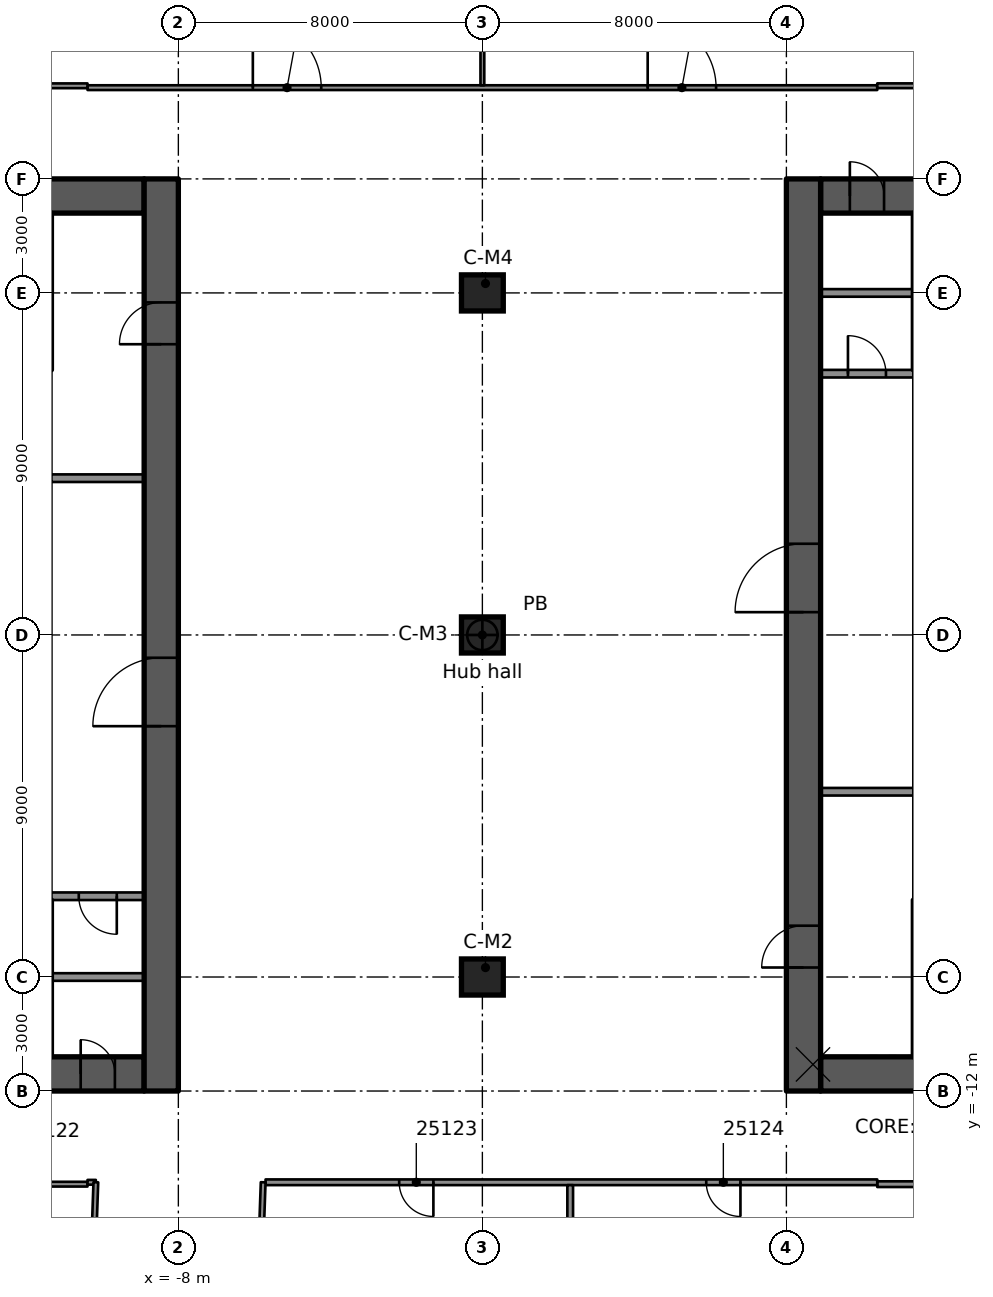
"""IFC4 building model, lengths in metres.
Left out: names, types, materials, properties, quantities, classifications, styles, units other than length and angle.
Written with IfcOpenShell. Run it as: python <this file> out.ifc"""

import sys

from ifc_helpers import new_model, si_unit, direction, frame, frame_2d, origin, origin_2d, place, context, subcontext, project, spatial, rectangle, extrude, element, fill, save


model = new_model("IFC4")
c1 = context("Model", 3, precision=1e-05, world=origin(), true_north=direction((0.0, 1.0)))
c2 = subcontext(c1, "Body", "Model", "MODEL_VIEW")
j1 = project(units=[si_unit("LENGTHUNIT", "METRE"), si_unit("PLANEANGLEUNIT", "RADIAN")], contexts=[c1])
p1 = place(None, origin())
s1 = spatial("IfcSite", under=j1, at=p1, CompositionType="ELEMENT")
p2 = place(p1, origin())
s2 = spatial("IfcBuilding", under=s1, at=p2, CompositionType="ELEMENT")
p3 = place(p2, frame((0.0, 0.0, 127.2)))
s3 = spatial("IfcBuildingStorey", under=s2, at=p3, CompositionType="ELEMENT", Elevation=127.2)
p4 = place(p3, frame((-18.1, 11.55, 0.0), z_axis=(0.0, 0.0, 1.0), x_axis=(1.0, 0.0, 0.0)))
e1 = element("IfcWall", 1, at=p4, inside=s3, PredefinedType="SHEAR", context=c2, shape_type="SweptSolid", body=[
    extrude(rectangle(XDim=9.2, YDim=0.9, at=frame_2d((4.6, 0.0))), origin(), (0.0, 0.0, 1.0), 3.5),
])
p5 = place(p4, frame((5.1, 0.0, 0.0)))
e2 = element("IfcOpeningElement", 2, at=p5, cuts=e1, PredefinedType="OPENING", context=c2, shape_type="SweptSolid", body=[
    extrude(rectangle(XDim=1.1, YDim=2.1, at=frame_2d((0.55, 1.05))), frame((0.0, 0.46, 0.0), z_axis=(0.0, -1.0, 0.0), x_axis=(1.0, 0.0, 0.0)), (0.0, 0.0, 1.0), 0.92),
])
p6 = place(p3, frame((-18.1, -11.55, 0.0), z_axis=(0.0, 0.0, 1.0), x_axis=(1.0, 0.0, 0.0)))
e3 = element("IfcWall", 3, at=p6, inside=s3, PredefinedType="SHEAR", context=c2, shape_type="SweptSolid", body=[
    extrude(rectangle(XDim=9.2, YDim=0.9, at=frame_2d((4.6, 0.0))), origin(), (0.0, 0.0, 1.0), 3.5),
])
p7 = place(p6, frame((5.1, 0.0, 0.0)))
e4 = element("IfcOpeningElement", 4, at=p7, cuts=e3, PredefinedType="OPENING", context=c2, shape_type="SweptSolid", body=[
    extrude(rectangle(XDim=1.1, YDim=2.1, at=frame_2d((0.55, 1.05))), frame((0.0, 0.46, 0.0), z_axis=(0.0, -1.0, 0.0), x_axis=(1.0, 0.0, 0.0)), (0.0, 0.0, 1.0), 0.92),
])
p8 = place(p6, frame((7.53, 0.0, 0.0)))
e5 = element("IfcOpeningElement", 5, at=p8, cuts=e3, PredefinedType="OPENING", context=c2, shape_type="SweptSolid", body=[
    extrude(rectangle(XDim=0.9, YDim=2.1, at=frame_2d((0.45, 1.05))), frame((0.0, 0.46, 0.0), z_axis=(0.0, -1.0, 0.0), x_axis=(1.0, 0.0, 0.0)), (0.0, 0.0, 1.0), 0.92),
])
p9 = place(p3, frame((-8.45, -12.0, 0.0), z_axis=(0.0, 0.0, 1.0), x_axis=(0.0, 1.0, 0.0)))
e6 = element("IfcWall", 6, at=p9, inside=s3, PredefinedType="SHEAR", context=c2, shape_type="SweptSolid", body=[
    extrude(rectangle(XDim=24.0, YDim=0.9, at=frame_2d((12.0, 0.0))), origin(), (0.0, 0.0, 1.0), 3.5),
])
p10 = place(p9, frame((9.6, 0.0, 0.0)))
e7 = element("IfcOpeningElement", 7, at=p10, cuts=e6, PredefinedType="OPENING", context=c2, shape_type="SweptSolid", body=[
    extrude(rectangle(XDim=1.8, YDim=2.1, at=frame_2d((0.9, 1.05))), frame((0.0, 0.46, 0.0), z_axis=(0.0, -1.0, 0.0), x_axis=(1.0, 0.0, 0.0)), (0.0, 0.0, 1.0), 0.92),
])
p11 = place(p9, frame((19.65, 0.0, 0.0)))
e8 = element("IfcOpeningElement", 8, at=p11, cuts=e6, PredefinedType="OPENING", context=c2, shape_type="SweptSolid", body=[
    extrude(rectangle(XDim=1.1, YDim=2.1, at=frame_2d((0.55, 1.05))), frame((0.0, 0.46, 0.0), z_axis=(0.0, -1.0, 0.0), x_axis=(1.0, 0.0, 0.0)), (0.0, 0.0, 1.0), 0.92),
])
p12 = place(p3, frame((8.9, 11.55, 0.0), z_axis=(0.0, 0.0, 1.0), x_axis=(1.0, 0.0, 0.0)))
e9 = element("IfcWall", 9, at=p12, inside=s3, PredefinedType="SHEAR", context=c2, shape_type="SweptSolid", body=[
    extrude(rectangle(XDim=9.2, YDim=0.9, at=frame_2d((4.6, 0.0))), origin(), (0.0, 0.0, 1.0), 3.5),
])
p13 = place(p12, frame((3.0, 0.0, 0.0)))
e10 = element("IfcOpeningElement", 10, at=p13, cuts=e9, PredefinedType="OPENING", context=c2, shape_type="SweptSolid", body=[
    extrude(rectangle(XDim=1.1, YDim=2.1, at=frame_2d((0.55, 1.05))), frame((0.0, 0.46, 0.0), z_axis=(0.0, -1.0, 0.0), x_axis=(1.0, 0.0, 0.0)), (0.0, 0.0, 1.0), 0.92),
])
p14 = place(p12, frame((0.77, 0.0, 0.0)))
e11 = element("IfcOpeningElement", 11, at=p14, cuts=e9, PredefinedType="OPENING", context=c2, shape_type="SweptSolid", body=[
    extrude(rectangle(XDim=0.9, YDim=2.1, at=frame_2d((0.45, 1.05))), frame((0.0, 0.46, 0.0), z_axis=(0.0, -1.0, 0.0), x_axis=(1.0, 0.0, 0.0)), (0.0, 0.0, 1.0), 0.92),
])
p15 = place(p3, frame((8.9, -11.55, 0.0), z_axis=(0.0, 0.0, 1.0), x_axis=(1.0, 0.0, 0.0)))
e12 = element("IfcWall", 12, at=p15, inside=s3, PredefinedType="SHEAR", context=c2, shape_type="SweptSolid", body=[
    extrude(rectangle(XDim=9.2, YDim=0.9, at=frame_2d((4.6, 0.0))), origin(), (0.0, 0.0, 1.0), 3.5),
])
p16 = place(p15, frame((3.0, 0.0, 0.0)))
e13 = element("IfcOpeningElement", 13, at=p16, cuts=e12, PredefinedType="OPENING", context=c2, shape_type="SweptSolid", body=[
    extrude(rectangle(XDim=1.1, YDim=2.1, at=frame_2d((0.55, 1.05))), frame((0.0, 0.46, 0.0), z_axis=(0.0, -1.0, 0.0), x_axis=(1.0, 0.0, 0.0)), (0.0, 0.0, 1.0), 0.92),
])
p17 = place(p3, frame((8.45, -12.0, 0.0), z_axis=(0.0, 0.0, 1.0), x_axis=(0.0, 1.0, 0.0)))
e14 = element("IfcWall", 14, at=p17, inside=s3, PredefinedType="SHEAR", context=c2, shape_type="SweptSolid", body=[
    extrude(rectangle(XDim=24.0, YDim=0.9, at=frame_2d((12.0, 0.0))), origin(), (0.0, 0.0, 1.0), 3.5),
])
p18 = place(p17, frame((12.6, 0.0, 0.0)))
e15 = element("IfcOpeningElement", 15, at=p18, cuts=e14, PredefinedType="OPENING", context=c2, shape_type="SweptSolid", body=[
    extrude(rectangle(XDim=1.8, YDim=2.1, at=frame_2d((0.9, 1.05))), frame((0.0, 0.46, 0.0), z_axis=(0.0, -1.0, 0.0), x_axis=(1.0, 0.0, 0.0)), (0.0, 0.0, 1.0), 0.92),
])
p19 = place(p17, frame((3.25, 0.0, 0.0)))
e16 = element("IfcOpeningElement", 16, at=p19, cuts=e14, PredefinedType="OPENING", context=c2, shape_type="SweptSolid", body=[
    extrude(rectangle(XDim=1.1, YDim=2.1, at=frame_2d((0.55, 1.05))), frame((0.0, 0.46, 0.0), z_axis=(0.0, -1.0, 0.0), x_axis=(1.0, 0.0, 0.0)), (0.0, 0.0, 1.0), 0.92),
])
for number, where, z_axis, x_axis in (
    (17, (0.0, -9.0, 0.0), (0.0, 0.0, 1.0), (1.0, 0.0, 0.0)),
    (18, (0.0, 0.0, 0.0), (0.0, 0.0, 1.0), (1.0, 0.0, 0.0)),
    (19, (0.0, 9.0, 0.0), (0.0, 0.0, 1.0), (1.0, 0.0, 0.0)),
):
    element("IfcColumn", number, at=place(p3, frame(where, z_axis=z_axis, x_axis=x_axis)), inside=s3, PredefinedType="COLUMN", context=c2, shape_type="SweptSolid", body=[
        extrude(rectangle(XDim=1.1, YDim=0.95, at=origin_2d()), origin(), (0.0, 0.0, 1.0), 3.5),
    ])
p20 = place(p3, frame((-8.9, 4.125, 0.0), z_axis=(0.0, 0.0, 1.0), x_axis=(-1.0, 0.0, 0.0)))
e20 = element("IfcWall", 20, at=p20, inside=s3, PredefinedType="PARTITIONING", context=c2, shape_type="SweptSolid", body=[
    extrude(rectangle(XDim=2.44, YDim=0.2, at=frame_2d((1.22, 0.0))), origin(), (0.0, 0.0, 1.0), 3.09),
])
p21 = place(p3, frame((-8.9, -6.875, 0.0), z_axis=(0.0, 0.0, 1.0), x_axis=(-1.0, 0.0, 0.0)))
e21 = element("IfcWall", 21, at=p21, inside=s3, PredefinedType="PARTITIONING", context=c2, shape_type="SweptSolid", body=[
    extrude(rectangle(XDim=2.44, YDim=0.2, at=frame_2d((1.22, 0.0))), origin(), (0.0, 0.0, 1.0), 3.09),
])
p22 = place(p21, frame((0.72, 0.0, 0.0)))
e22 = element("IfcOpeningElement", 22, at=p22, cuts=e21, PredefinedType="OPENING", context=c2, shape_type="SweptSolid", body=[
    extrude(rectangle(XDim=1.0, YDim=2.1, at=frame_2d((0.5, 1.05))), frame((0.0, 0.11, 0.0), z_axis=(0.0, -1.0, 0.0), x_axis=(1.0, 0.0, 0.0)), (0.0, 0.0, 1.0), 0.22),
])
for number, where, z_axis, x_axis in (
    (23, (-8.9, -9.0, 0.0), (0.0, 0.0, 1.0), (-1.0, 0.0, 0.0)),
    (24, (8.9, -4.125, 0.0), (0.0, 0.0, 1.0), (1.0, 0.0, 0.0)),
):
    element("IfcWall", number, at=place(p3, frame(where, z_axis=z_axis, x_axis=x_axis)), inside=s3, PredefinedType="PARTITIONING", context=c2, shape_type="SweptSolid", body=[
        extrude(rectangle(XDim=2.44, YDim=0.2, at=frame_2d((1.22, 0.0))), origin(), (0.0, 0.0, 1.0), 3.09),
    ])
p23 = place(p3, frame((8.9, 6.875, 0.0), z_axis=(0.0, 0.0, 1.0), x_axis=(1.0, 0.0, 0.0)))
e25 = element("IfcWall", 25, at=p23, inside=s3, PredefinedType="PARTITIONING", context=c2, shape_type="SweptSolid", body=[
    extrude(rectangle(XDim=2.44, YDim=0.2, at=frame_2d((1.22, 0.0))), origin(), (0.0, 0.0, 1.0), 3.09),
])
p24 = place(p23, frame((0.72, 0.0, 0.0)))
e26 = element("IfcOpeningElement", 26, at=p24, cuts=e25, PredefinedType="OPENING", context=c2, shape_type="SweptSolid", body=[
    extrude(rectangle(XDim=1.0, YDim=2.1, at=frame_2d((0.5, 1.05))), frame((0.0, 0.11, 0.0), z_axis=(0.0, -1.0, 0.0), x_axis=(1.0, 0.0, 0.0)), (0.0, 0.0, 1.0), 0.22),
])
p25 = place(p3, frame((8.9, 9.0, 0.0), z_axis=(0.0, 0.0, 1.0), x_axis=(1.0, 0.0, 0.0)))
e27 = element("IfcWall", 27, at=p25, inside=s3, PredefinedType="PARTITIONING", context=c2, shape_type="SweptSolid", body=[
    extrude(rectangle(XDim=2.44, YDim=0.2, at=frame_2d((1.22, 0.0))), origin(), (0.0, 0.0, 1.0), 3.09),
])
p26 = place(p3, frame((-10.391, -14.451, 0.0), z_axis=(0.0, 0.0, 1.0), x_axis=(-1.0, 0.0, 0.0)))
e28 = element("IfcWall", 28, at=p26, inside=s3, PredefinedType="PARTITIONING", context=c2, shape_type="SweptSolid", body=[
    extrude(rectangle(XDim=3.609, YDim=0.125, at=frame_2d((1.804, 0.0))), origin(), (0.0, 0.0, 1.0), 3.08),
])
p27 = place(p26, frame((1.35, 0.0, 0.0)))
e29 = element("IfcOpeningElement", 29, at=p27, cuts=e28, PredefinedType="OPENING", context=c2, shape_type="SweptSolid", body=[
    extrude(rectangle(XDim=0.9, YDim=2.1, at=frame_2d((0.45, 1.05))), frame((0.0, 0.073, 0.0), z_axis=(0.0, -1.0, 0.0), x_axis=(1.0, 0.0, 0.0)), (0.0, 0.0, 1.0), 0.145),
])
p28 = place(p3, frame((21.387, -14.451, 0.0), z_axis=(0.0, 0.0, 1.0), x_axis=(-1.0, 0.0, 0.0)))
e30 = element("IfcWall", 30, at=p28, inside=s3, PredefinedType="PARTITIONING", context=c2, shape_type="SweptSolid", body=[
    extrude(rectangle(XDim=10.996, YDim=0.15, at=frame_2d((5.498, 0.0))), origin(), (0.0, 0.0, 1.0), 3.08),
])
p29 = place(p28, frame((3.288, 0.0, 0.0)))
e31 = element("IfcOpeningElement", 31, at=p29, cuts=e30, PredefinedType="OPENING", context=c2, shape_type="SweptSolid", body=[
    extrude(rectangle(XDim=0.9, YDim=2.1, at=frame_2d((0.45, 1.05))), frame((0.0, 0.085, 0.0), z_axis=(0.0, -1.0, 0.0), x_axis=(1.0, 0.0, 0.0)), (0.0, 0.0, 1.0), 0.17),
])
p30 = place(p3, frame((-10.39, -14.401, 0.0), z_axis=(0.0, 0.0, 1.0), x_axis=(1.0, 0.0, 0.0)))
e32 = element("IfcWall", 32, at=p30, inside=s3, PredefinedType="PARTITIONING", context=c2, shape_type="SweptSolid", body=[
    extrude(rectangle(XDim=0.219, YDim=0.125, at=frame_2d((0.109, 0.0))), origin(), (0.0, 0.0, 1.0), 3.08),
])
p31 = place(p3, frame((10.391, -14.401, 0.0), z_axis=(0.0, 0.0, 1.0), x_axis=(-1.0, 0.0, 0.0)))
e33 = element("IfcWall", 33, at=p31, inside=s3, PredefinedType="PARTITIONING", context=c2, shape_type="SweptSolid", body=[
    extrude(rectangle(XDim=16.096, YDim=0.15, at=frame_2d((8.048, 0.0))), origin(), (0.0, 0.0, 1.0), 3.08),
])
p32 = place(p31, frame((11.68, 0.0, 0.0)))
e34 = element("IfcOpeningElement", 34, at=p32, cuts=e33, PredefinedType="OPENING", context=c2, shape_type="SweptSolid", body=[
    extrude(rectangle(XDim=0.9, YDim=2.1, at=frame_2d((0.45, 1.05))), frame((0.0, 0.085, 0.0), z_axis=(0.0, -1.0, 0.0), x_axis=(1.0, 0.0, 0.0)), (0.0, 0.0, 1.0), 0.17),
])
p33 = place(p31, frame((3.6, 0.0, 0.0)))
e35 = element("IfcOpeningElement", 35, at=p33, cuts=e33, PredefinedType="OPENING", context=c2, shape_type="SweptSolid", body=[
    extrude(rectangle(XDim=0.9, YDim=2.1, at=frame_2d((0.45, 1.05))), frame((0.0, 0.085, 0.0), z_axis=(0.0, -1.0, 0.0), x_axis=(1.0, 0.0, 0.0)), (0.0, 0.0, 1.0), 0.17),
])
p34 = place(p3, frame((-10.39, 14.401, 0.0), z_axis=(0.0, 0.0, 1.0), x_axis=(1.0, 0.0, 0.0)))
e36 = element("IfcWall", 36, at=p34, inside=s3, PredefinedType="PARTITIONING", context=c2, shape_type="SweptSolid", body=[
    extrude(rectangle(XDim=20.781, YDim=0.125, at=frame_2d((10.391, 0.0))), origin(), (0.0, 0.0, 1.0), 3.08),
])
p35 = place(p34, frame((14.74, 0.0, 0.0)))
e37 = element("IfcOpeningElement", 37, at=p35, cuts=e36, PredefinedType="OPENING", context=c2, shape_type="SweptSolid", body=[
    extrude(rectangle(XDim=1.8, YDim=2.1, at=frame_2d((0.9, 1.05))), frame((0.0, 0.073, 0.0), z_axis=(0.0, -1.0, 0.0), x_axis=(1.0, 0.0, 0.0)), (0.0, 0.0, 1.0), 0.145),
])
p36 = place(p34, frame((4.35, 0.0, 0.0)))
e38 = element("IfcOpeningElement", 38, at=p36, cuts=e36, PredefinedType="OPENING", context=c2, shape_type="SweptSolid", body=[
    extrude(rectangle(XDim=1.8, YDim=2.1, at=frame_2d((0.9, 1.05))), frame((0.0, 0.073, 0.0), z_axis=(0.0, -1.0, 0.0), x_axis=(1.0, 0.0, 0.0)), (0.0, 0.0, 1.0), 0.145),
])
p37 = place(p3, frame((-25.398, 14.45, 0.0), z_axis=(0.0, 0.0, 1.0), x_axis=(1.0, 0.0, 0.0)))
e39 = element("IfcWall", 39, at=p37, inside=s3, PredefinedType="PARTITIONING", context=c2, shape_type="SweptSolid", body=[
    extrude(rectangle(XDim=15.007, YDim=0.125, at=frame_2d((7.503, 0.0))), origin(), (0.0, 0.0, 1.0), 3.08),
])
p38 = place(p3, frame((10.391, 14.451, 0.0), z_axis=(0.0, 0.0, 1.0), x_axis=(1.0, 0.0, 0.0)))
e40 = element("IfcWall", 40, at=p38, inside=s3, PredefinedType="PARTITIONING", context=c2, shape_type="SweptSolid", body=[
    extrude(rectangle(XDim=10.996, YDim=0.125, at=frame_2d((5.498, 0.0))), origin(), (0.0, 0.0, 1.0), 3.08),
])
p39 = place(p38, frame((6.459, 0.0, 0.0)))
e41 = element("IfcOpeningElement", 41, at=p39, cuts=e40, PredefinedType="OPENING", context=c2, shape_type="SweptSolid", body=[
    extrude(rectangle(XDim=1.8, YDim=2.1, at=frame_2d((0.9, 1.05))), frame((0.0, 0.073, 0.0), z_axis=(0.0, -1.0, 0.0), x_axis=(1.0, 0.0, 0.0)), (0.0, 0.0, 1.0), 0.145),
])
p40 = place(p3, frame((-5.768, -14.401, 0.0), z_axis=(0.0, 0.0, 1.0), x_axis=(-0.035129220635, -0.999382778448, 0.0)))
e42 = element("IfcWall", 42, at=p40, inside=s3, PredefinedType="PARTITIONING", context=c2, shape_type="SweptSolid", body=[
    extrude(rectangle(XDim=16.819, YDim=0.125, at=frame_2d((8.409, 0.0))), origin(), (0.0, 0.0, 1.0), 3.08),
])
p41 = place(p40, frame((12.981, 0.0, 0.0)))
e43 = element("IfcOpeningElement", 43, at=p41, cuts=e42, PredefinedType="OPENING", context=c2, shape_type="SweptSolid", body=[
    extrude(rectangle(XDim=1.1, YDim=2.1, at=frame_2d((0.55, 1.05))), frame((0.0, 0.073, 0.0), z_axis=(0.0, -1.0, 0.0), x_axis=(1.0, 0.0, 0.0)), (0.0, 0.0, 1.0), 0.145),
])
p42 = place(p3, frame((-10.578, -25.948, 0.0), z_axis=(0.0, 0.0, 1.0), x_axis=(0.035223493249, 0.999379460227, 0.0)))
e44 = element("IfcWall", 44, at=p42, inside=s3, PredefinedType="PARTITIONING", context=c2, shape_type="SweptSolid", body=[
    extrude(rectangle(XDim=11.554, YDim=0.125, at=frame_2d((5.777, 0.0))), origin(), (0.0, 0.0, 1.0), 3.08),
])
p43 = place(p3, frame((2.311, -35.659, 0.0), z_axis=(0.0, 0.0, 1.0), x_axis=(0.0, 1.0, 0.0)))
e45 = element("IfcWall", 45, at=p43, inside=s3, PredefinedType="PARTITIONING", context=c2, shape_type="SweptSolid", body=[
    extrude(rectangle(XDim=21.183, YDim=0.15, at=frame_2d((10.591, 0.0))), origin(), (0.0, 0.0, 1.0), 3.08),
])
p44 = place(p3, frame((0.0, 14.463, 0.0), z_axis=(0.0, 0.0, 1.0), x_axis=(0.0, 1.0, 0.0)))
e46 = element("IfcWall", 46, at=p44, inside=s3, PredefinedType="PARTITIONING", context=c2, shape_type="SweptSolid", body=[
    extrude(rectangle(XDim=17.114, YDim=0.1, at=frame_2d((8.557, 0.0))), origin(), (0.0, 0.0, 1.0), 3.08),
])
p45 = place(p10, origin())
e47 = element("IfcDoor", 47, at=p45, inside=s3, OperationType="SINGLE_SWING_LEFT", PredefinedType="DOOR", context=c2, shape_type="SweptSolid", body=[
    extrude(rectangle(XDim=1.8, YDim=2.1, at=frame_2d((0.9, 1.05))), frame((0.0, 0.025, 0.0), z_axis=(0.0, -1.0, 0.0), x_axis=(1.0, 0.0, 0.0)), (0.0, 0.0, 1.0), 0.05),
])
fill(e7, e47)
p46 = place(p11, origin())
e48 = element("IfcDoor", 48, at=p46, inside=s3, OperationType="SINGLE_SWING_RIGHT", PredefinedType="DOOR", context=c2, shape_type="SweptSolid", body=[
    extrude(rectangle(XDim=1.1, YDim=2.1, at=frame_2d((0.55, 1.05))), frame((0.0, 0.025, 0.0), z_axis=(0.0, -1.0, 0.0), x_axis=(1.0, 0.0, 0.0)), (0.0, 0.0, 1.0), 0.05),
])
fill(e8, e48)
p47 = place(p8, origin())
e49 = element("IfcDoor", 49, at=p47, inside=s3, OperationType="SINGLE_SWING_RIGHT", PredefinedType="DOOR", context=c2, shape_type="SweptSolid", body=[
    extrude(rectangle(XDim=0.9, YDim=2.1, at=frame_2d((0.45, 1.05))), frame((0.0, 0.025, 0.0), z_axis=(0.0, -1.0, 0.0), x_axis=(1.0, 0.0, 0.0)), (0.0, 0.0, 1.0), 0.05),
])
fill(e5, e49)
p48 = place(p22, origin())
e50 = element("IfcDoor", 50, at=p48, inside=s3, OperationType="SINGLE_SWING_RIGHT", PredefinedType="DOOR", context=c2, shape_type="SweptSolid", body=[
    extrude(rectangle(XDim=1.0, YDim=2.1, at=frame_2d((0.5, 1.05))), frame((0.0, 0.025, 0.0), z_axis=(0.0, -1.0, 0.0), x_axis=(1.0, 0.0, 0.0)), (0.0, 0.0, 1.0), 0.05),
])
fill(e22, e50)
p49 = place(p18, origin())
e51 = element("IfcDoor", 51, at=p49, inside=s3, OperationType="SINGLE_SWING_RIGHT", PredefinedType="DOOR", context=c2, shape_type="SweptSolid", body=[
    extrude(rectangle(XDim=1.8, YDim=2.1, at=frame_2d((0.9, 1.05))), frame((0.0, 0.025, 0.0), z_axis=(0.0, -1.0, 0.0), x_axis=(1.0, 0.0, 0.0)), (0.0, 0.0, 1.0), 0.05),
])
fill(e15, e51)
p50 = place(p19, origin())
e52 = element("IfcDoor", 52, at=p50, inside=s3, OperationType="SINGLE_SWING_LEFT", PredefinedType="DOOR", context=c2, shape_type="SweptSolid", body=[
    extrude(rectangle(XDim=1.1, YDim=2.1, at=frame_2d((0.55, 1.05))), frame((0.0, 0.025, 0.0), z_axis=(0.0, -1.0, 0.0), x_axis=(1.0, 0.0, 0.0)), (0.0, 0.0, 1.0), 0.05),
])
fill(e16, e52)
p51 = place(p14, origin())
e53 = element("IfcDoor", 53, at=p51, inside=s3, OperationType="SINGLE_SWING_LEFT", PredefinedType="DOOR", context=c2, shape_type="SweptSolid", body=[
    extrude(rectangle(XDim=0.9, YDim=2.1, at=frame_2d((0.45, 1.05))), frame((0.0, 0.025, 0.0), z_axis=(0.0, -1.0, 0.0), x_axis=(1.0, 0.0, 0.0)), (0.0, 0.0, 1.0), 0.05),
])
fill(e11, e53)
p52 = place(p24, origin())
e54 = element("IfcDoor", 54, at=p52, inside=s3, OperationType="SINGLE_SWING_RIGHT", PredefinedType="DOOR", context=c2, shape_type="SweptSolid", body=[
    extrude(rectangle(XDim=1.0, YDim=2.1, at=frame_2d((0.5, 1.05))), frame((0.0, 0.025, 0.0), z_axis=(0.0, -1.0, 0.0), x_axis=(1.0, 0.0, 0.0)), (0.0, 0.0, 1.0), 0.05),
])
fill(e26, e54)
p53 = place(p32, origin())
e55 = element("IfcDoor", 55, at=p53, inside=s3, OperationType="SINGLE_SWING_RIGHT", PredefinedType="DOOR", context=c2, shape_type="SweptSolid", body=[
    extrude(rectangle(XDim=0.9, YDim=2.1, at=frame_2d((0.45, 1.05))), frame((0.0, 0.025, 0.0), z_axis=(0.0, -1.0, 0.0), x_axis=(1.0, 0.0, 0.0)), (0.0, 0.0, 1.0), 0.05),
])
fill(e34, e55)
p54 = place(p33, origin())
e56 = element("IfcDoor", 56, at=p54, inside=s3, OperationType="SINGLE_SWING_LEFT", PredefinedType="DOOR", context=c2, shape_type="SweptSolid", body=[
    extrude(rectangle(XDim=0.9, YDim=2.1, at=frame_2d((0.45, 1.05))), frame((0.0, 0.025, 0.0), z_axis=(0.0, -1.0, 0.0), x_axis=(1.0, 0.0, 0.0)), (0.0, 0.0, 1.0), 0.05),
])
fill(e35, e56)
p55 = place(p35, origin())
e57 = element("IfcDoor", 57, at=p55, inside=s3, OperationType="DOUBLE_DOOR_SINGLE_SWING", PredefinedType="DOOR", context=c2, shape_type="SweptSolid", body=[
    extrude(rectangle(XDim=1.8, YDim=2.1, at=frame_2d((0.9, 1.05))), frame((0.0, 0.025, 0.0), z_axis=(0.0, -1.0, 0.0), x_axis=(1.0, 0.0, 0.0)), (0.0, 0.0, 1.0), 0.05),
])
fill(e37, e57)
p56 = place(p36, origin())
e58 = element("IfcDoor", 58, at=p56, inside=s3, OperationType="DOUBLE_DOOR_SINGLE_SWING", PredefinedType="DOOR", context=c2, shape_type="SweptSolid", body=[
    extrude(rectangle(XDim=1.8, YDim=2.1, at=frame_2d((0.9, 1.05))), frame((0.0, 0.025, 0.0), z_axis=(0.0, -1.0, 0.0), x_axis=(1.0, 0.0, 0.0)), (0.0, 0.0, 1.0), 0.05),
])
fill(e38, e58)
save(model, sys.argv[1])
